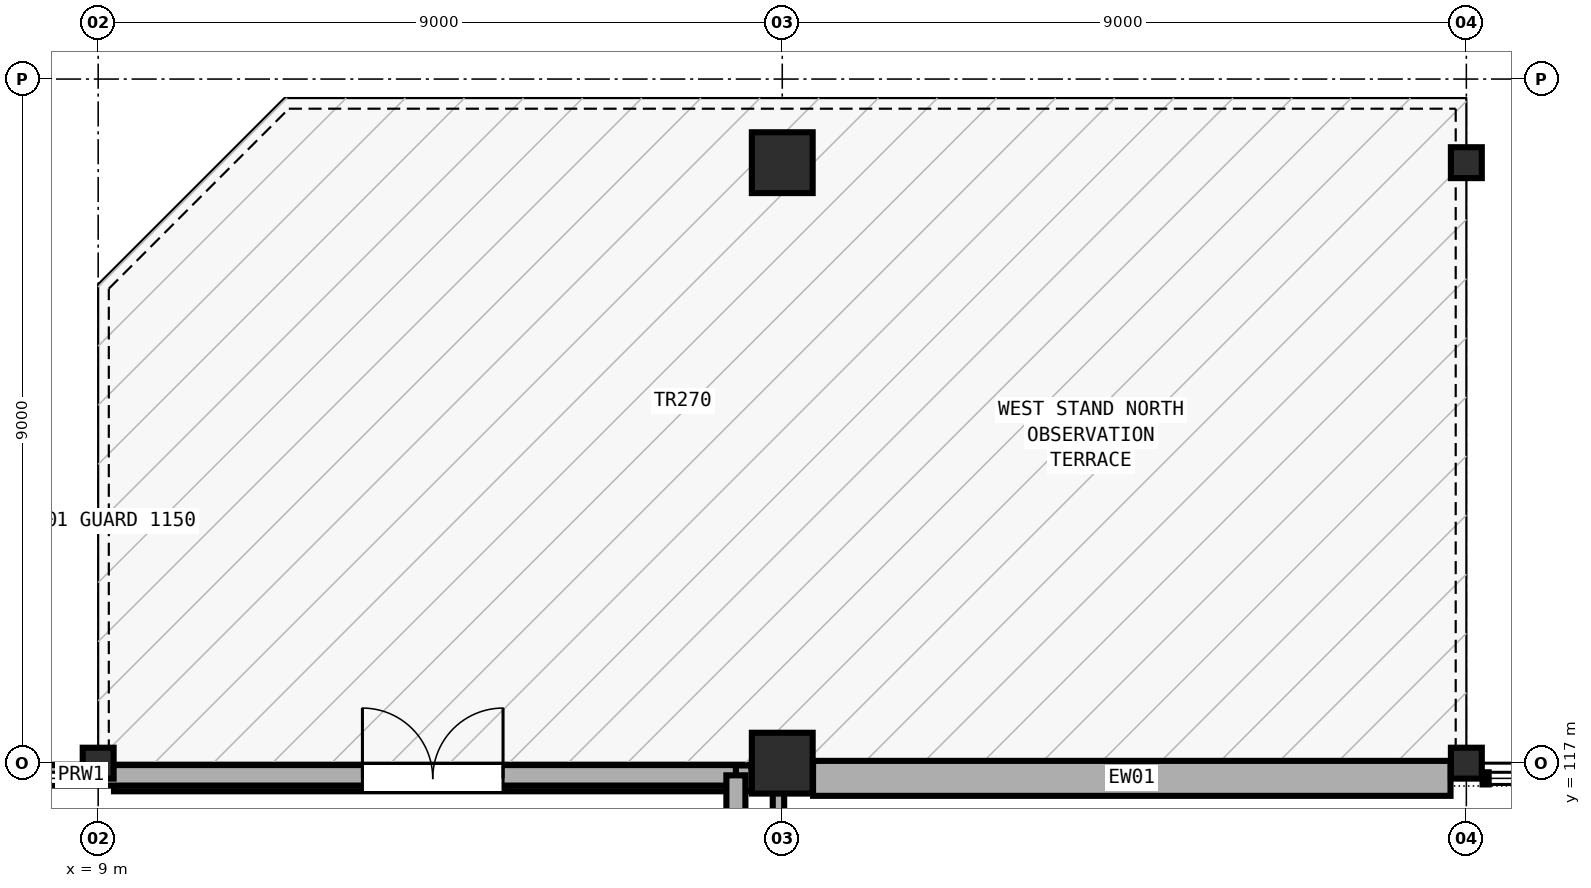
"""IFC4 building model, lengths in metres.
Left out: names, types, materials, properties, quantities, classifications, styles, units other than length and angle.
Written with IfcOpenShell. Run it as: python <this file> out.ifc"""

import sys

from ifc_helpers import new_model, si_unit, direction, frame, frame_2d, origin, origin_2d, place, context, subcontext, project, spatial, rectangle, hollow_circle, extrude, element, fill, save


model = new_model("IFC4")
c1 = context("Model", 3, precision=1e-05, world=origin(), true_north=direction((0.0, 1.0)))
c2 = subcontext(c1, "Body", "Model", "MODEL_VIEW")
j1 = project(units=[si_unit("LENGTHUNIT", "METRE"), si_unit("PLANEANGLEUNIT", "RADIAN")], contexts=[c1])
p1 = place(None, origin())
s1 = spatial("IfcSite", under=j1, at=p1, CompositionType="ELEMENT")
p2 = place(p1, origin())
s2 = spatial("IfcBuilding", under=s1, at=p2, CompositionType="ELEMENT")
p3 = place(p2, frame((0.0, 0.0, 24.0)))
s3 = spatial("IfcBuildingStorey", under=s2, at=p3, CompositionType="ELEMENT", Elevation=24.0)
p4 = place(p3, frame((9.0, 117.0, 0.0), z_axis=(0.0, 0.0, 1.0), x_axis=(1.0, 0.0, 0.0)))
e1 = element("IfcColumn", 1, at=p4, inside=s3, PredefinedType="COLUMN", context=c2, shape_type="SweptSolid", body=[
    extrude(hollow_circle(Radius=0.203, WallThickness=0.014, at=origin_2d()), origin(), (0.0, 0.0, 1.0), 4.8),
])
for number, where, z_axis, x_axis in (
    (2, (18.0, 117.0, 0.0), (0.0, 0.0, 1.0), (1.0, 0.0, 0.0)),
    (3, (18.0, 124.9, 0.0), (0.0, 0.0, 1.0), (1.0, 0.0, 0.0)),
):
    element("IfcColumn", number, at=place(p3, frame(where, z_axis=z_axis, x_axis=x_axis)), inside=s3, PredefinedType="COLUMN", context=c2, shape_type="SweptSolid", body=[
        extrude(rectangle(XDim=0.8, YDim=0.8, at=origin_2d()), origin(), (0.0, 0.0, 1.0), 4.8),
    ])
for number, where, z_axis, x_axis in (
    (4, (27.0, 117.0, 0.0), (0.0, 0.0, 1.0), (1.0, 0.0, 0.0)),
    (5, (27.0, 124.9, 0.0), (0.0, 0.0, 1.0), (1.0, 0.0, 0.0)),
):
    element("IfcColumn", number, at=place(p3, frame(where, z_axis=z_axis, x_axis=x_axis)), inside=s3, PredefinedType="COLUMN", context=c2, shape_type="SweptSolid", body=[
        extrude(hollow_circle(Radius=0.203, WallThickness=0.014, at=origin_2d()), origin(), (0.0, 0.0, 1.0), 4.8),
    ])
p5 = place(p3, frame((9.208, 116.8, 0.0), z_axis=(0.0, 0.0, 1.0), x_axis=(1.0, 0.0, 0.0)))
e6 = element("IfcWall", 6, at=p5, inside=s3, PredefinedType="SOLIDWALL", context=c2, shape_type="SweptSolid", body=[
    extrude(rectangle(XDim=8.387, YDim=0.34, at=frame_2d((4.193, 0.0))), origin(), (0.0, 0.0, 1.0), 3.58),
])
p6 = place(p5, frame((3.268, 0.0, 0.0)))
e7 = element("IfcOpeningElement", 7, at=p6, cuts=e6, PredefinedType="OPENING", context=c2, shape_type="SweptSolid", body=[
    extrude(rectangle(XDim=1.85, YDim=2.25, at=frame_2d((0.925, 1.125))), frame((0.0, 0.18, 0.0), z_axis=(0.0, -1.0, 0.0), x_axis=(1.0, 0.0, 0.0)), (0.0, 0.0, 1.0), 0.36),
])
p7 = place(p3, frame((18.405, 116.8, 0.0), z_axis=(0.0, 0.0, 1.0), x_axis=(1.0, 0.0, 0.0)))
e8 = element("IfcWall", 8, at=p7, inside=s3, PredefinedType="SOLIDWALL", context=c2, shape_type="SweptSolid", body=[
    extrude(rectangle(XDim=8.387, YDim=0.46, at=frame_2d((4.193, 0.0))), origin(), (0.0, 0.0, 1.0), 3.58),
])
p8 = place(p3, frame((0.16, 116.84, 4.8), z_axis=(0.0, 0.0, 1.0), x_axis=(1.0, 0.0, 0.0)))
e9 = element("IfcWall", 9, at=p8, inside=s3, PredefinedType="PARAPET", context=c2, shape_type="SweptSolid", body=[
    extrude(rectangle(XDim=17.23, YDim=0.27, at=frame_2d((8.615, 0.0))), origin(), (0.0, 0.0, 1.0), 0.65),
])
p9 = place(p3, frame((17.39, 116.84, 4.8), z_axis=(0.0, 0.0, 1.0), x_axis=(0.0, -1.0, 0.0)))
e10 = element("IfcWall", 10, at=p9, inside=s3, PredefinedType="PARAPET", context=c2, shape_type="SweptSolid", body=[
    extrude(rectangle(XDim=71.68, YDim=0.25, at=frame_2d((35.84, 0.0))), origin(), (0.0, 0.0, 1.0), 0.65),
])
p10 = place(p3, frame((17.95, 116.76, 0.0), z_axis=(0.0, 0.0, 1.0), x_axis=(0.0, -1.0, 0.0)))
e11 = element("IfcWall", 11, at=p10, inside=s3, PredefinedType="PARTITIONING", context=c2, shape_type="SweptSolid", body=[
    extrude(rectangle(XDim=7.958, YDim=0.15, at=frame_2d((3.979, 0.0))), origin(), (0.0, 0.0, 1.0), 3.56),
])
p11 = place(p6, origin())
e12 = element("IfcDoor", 12, at=p11, inside=s3, OperationType="DOUBLE_DOOR_SINGLE_SWING", PredefinedType="DOOR", context=c2, shape_type="SweptSolid", body=[
    extrude(rectangle(XDim=1.85, YDim=2.25, at=frame_2d((0.925, 1.125))), frame((0.0, 0.025, 0.0), z_axis=(0.0, -1.0, 0.0), x_axis=(1.0, 0.0, 0.0)), (0.0, 0.0, 1.0), 0.05),
])
fill(e7, e12)
save(model, sys.argv[1])
